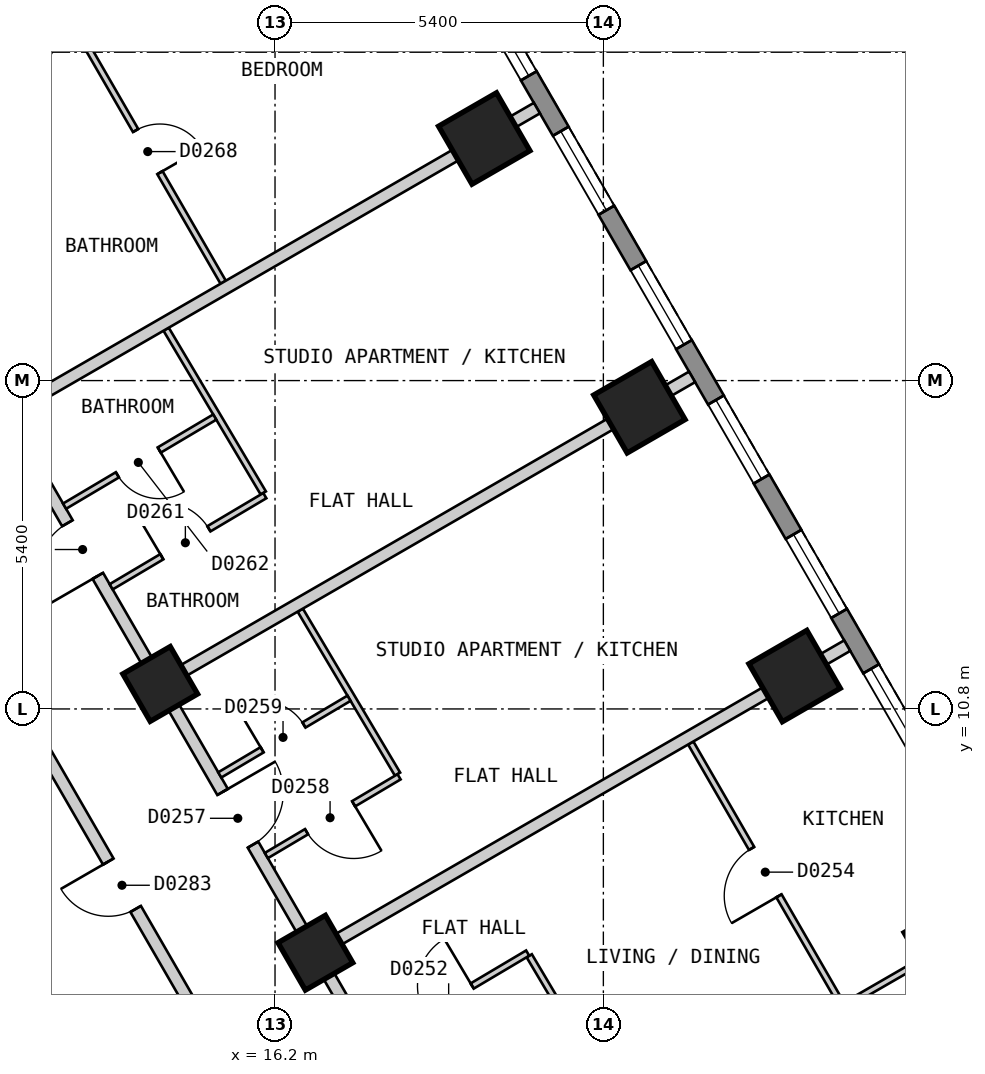
"""IFC4 building model, lengths in metres.
Left out: names, types, materials, properties, quantities, classifications, styles, units other than length and angle.
Written with IfcOpenShell. Run it as: python <this file> out.ifc"""

import sys

from ifc_helpers import new_model, si_unit, direction, frame, frame_2d, origin, origin_2d, place, context, subcontext, project, spatial, polyline, rectangle, outline, extrude, element, fill, save


model = new_model("IFC4")
c1 = context("Model", 3, precision=1e-05, world=origin(), true_north=direction((0.0, 1.0)))
c2 = subcontext(c1, "Body", "Model", "MODEL_VIEW")
j1 = project(units=[si_unit("LENGTHUNIT", "METRE"), si_unit("PLANEANGLEUNIT", "RADIAN")], contexts=[c1])
p1 = place(None, origin())
s1 = spatial("IfcSite", under=j1, at=p1, CompositionType="ELEMENT")
p2 = place(p1, origin())
s2 = spatial("IfcBuilding", under=s1, at=p2, CompositionType="ELEMENT")
p3 = place(p2, frame((0.0, 0.0, 41.4)))
s3 = spatial("IfcBuildingStorey", under=s2, at=p3, CompositionType="ELEMENT", Elevation=41.4)
for number, where, z_axis, x_axis in (
    (1, (27.297, 6.921, 0.0), (0.0, 0.0, 1.0), (-0.5, 0.866, 0.0)),
    (2, (24.745, 11.341, 0.0), (0.0, 0.0, 1.0), (-0.5, 0.866, 0.0)),
    (3, (22.193, 15.761, 0.0), (0.0, 0.0, 1.0), (-0.5, 0.866, 0.0)),
    (4, (19.641, 20.181, 0.0), (0.0, 0.0, 1.0), (-0.5, 0.866, 0.0)),
):
    element("IfcColumn", number, at=place(p3, frame(where, z_axis=z_axis, x_axis=x_axis)), inside=s3, PredefinedType="COLUMN", context=c2, shape_type="SweptSolid", body=[
        extrude(rectangle(XDim=1.1, YDim=1.1, at=origin_2d()), origin(), (0.0, 0.0, 1.0), 3.0),
    ])
for number, where, z_axis, x_axis in (
    (5, (16.864, 6.791, 0.0), (0.0, 0.0, 1.0), (-0.5, 0.866, 0.0)),
    (6, (14.312, 11.211, 0.0), (0.0, 0.0, 1.0), (-0.5, 0.866, 0.0)),
):
    element("IfcColumn", number, at=place(p3, frame(where, z_axis=z_axis, x_axis=x_axis)), inside=s3, PredefinedType="COLUMN", context=c2, shape_type="SweptSolid", body=[
        extrude(rectangle(XDim=0.9, YDim=0.9, at=origin_2d()), origin(), (0.0, 0.0, 1.0), 3.0),
    ])
p4 = place(p3, frame((31.22, 2.425, 0.0), z_axis=(0.0, 0.0, 1.0), x_axis=(-0.500001938803, 0.866024284413, 0.0)))
e7 = element("IfcWall", 7, at=p4, inside=s3, PredefinedType="SOLIDWALL", context=c2, shape_type="SweptSolid", body=[
    extrude(outline(polyline([(0.0, -0.15), (27.02, -0.15), (26.94, 0.15), (0.08, 0.15), (0.0, -0.15)])), origin(), (0.0, 0.0, 1.0), 2.7),
])
p5 = place(p4, frame((1.277, 0.0, 0.15)))
e8 = element("IfcOpeningElement", 8, at=p5, cuts=e7, PredefinedType="OPENING", context=c2, shape_type="SweptSolid", body=[
    extrude(rectangle(XDim=1.5, YDim=2.1, at=frame_2d((0.75, 1.05))), frame((0.0, 0.16, 0.0), z_axis=(0.0, -1.0, 0.0), x_axis=(1.0, 0.0, 0.0)), (0.0, 0.0, 1.0), 0.32),
])
p6 = place(p4, frame((3.829, 0.0, 0.15)))
e9 = element("IfcOpeningElement", 9, at=p6, cuts=e7, PredefinedType="OPENING", context=c2, shape_type="SweptSolid", body=[
    extrude(rectangle(XDim=1.5, YDim=2.1, at=frame_2d((0.75, 1.05))), frame((0.0, 0.16, 0.0), z_axis=(0.0, -1.0, 0.0), x_axis=(1.0, 0.0, 0.0)), (0.0, 0.0, 1.0), 0.32),
])
p7 = place(p4, frame((6.382, 0.0, 0.15)))
e10 = element("IfcOpeningElement", 10, at=p7, cuts=e7, PredefinedType="OPENING", context=c2, shape_type="SweptSolid", body=[
    extrude(rectangle(XDim=1.5, YDim=2.1, at=frame_2d((0.75, 1.05))), frame((0.0, 0.16, 0.0), z_axis=(0.0, -1.0, 0.0), x_axis=(1.0, 0.0, 0.0)), (0.0, 0.0, 1.0), 0.32),
])
p8 = place(p4, frame((8.933, 0.0, 0.15)))
e11 = element("IfcOpeningElement", 11, at=p8, cuts=e7, PredefinedType="OPENING", context=c2, shape_type="SweptSolid", body=[
    extrude(rectangle(XDim=1.5, YDim=2.1, at=frame_2d((0.75, 1.05))), frame((0.0, 0.16, 0.0), z_axis=(0.0, -1.0, 0.0), x_axis=(1.0, 0.0, 0.0)), (0.0, 0.0, 1.0), 0.32),
])
p9 = place(p4, frame((11.485, 0.0, 0.15)))
e12 = element("IfcOpeningElement", 12, at=p9, cuts=e7, PredefinedType="OPENING", context=c2, shape_type="SweptSolid", body=[
    extrude(rectangle(XDim=1.5, YDim=2.1, at=frame_2d((0.75, 1.05))), frame((0.0, 0.16, 0.0), z_axis=(0.0, -1.0, 0.0), x_axis=(1.0, 0.0, 0.0)), (0.0, 0.0, 1.0), 0.32),
])
p10 = place(p4, frame((14.037, 0.0, 0.15)))
e13 = element("IfcOpeningElement", 13, at=p10, cuts=e7, PredefinedType="OPENING", context=c2, shape_type="SweptSolid", body=[
    extrude(rectangle(XDim=1.5, YDim=2.1, at=frame_2d((0.75, 1.05))), frame((0.0, 0.16, 0.0), z_axis=(0.0, -1.0, 0.0), x_axis=(1.0, 0.0, 0.0)), (0.0, 0.0, 1.0), 0.32),
])
p11 = place(p4, frame((16.589, 0.0, 0.15)))
e14 = element("IfcOpeningElement", 14, at=p11, cuts=e7, PredefinedType="OPENING", context=c2, shape_type="SweptSolid", body=[
    extrude(rectangle(XDim=1.5, YDim=2.1, at=frame_2d((0.75, 1.05))), frame((0.0, 0.16, 0.0), z_axis=(0.0, -1.0, 0.0), x_axis=(1.0, 0.0, 0.0)), (0.0, 0.0, 1.0), 0.32),
])
p12 = place(p4, frame((19.141, 0.0, 0.15)))
e15 = element("IfcOpeningElement", 15, at=p12, cuts=e7, PredefinedType="OPENING", context=c2, shape_type="SweptSolid", body=[
    extrude(rectangle(XDim=1.5, YDim=2.1, at=frame_2d((0.75, 1.05))), frame((0.0, 0.16, 0.0), z_axis=(0.0, -1.0, 0.0), x_axis=(1.0, 0.0, 0.0)), (0.0, 0.0, 1.0), 0.32),
])
p13 = place(p4, frame((21.693, 0.0, 0.15)))
e16 = element("IfcOpeningElement", 16, at=p13, cuts=e7, PredefinedType="OPENING", context=c2, shape_type="SweptSolid", body=[
    extrude(rectangle(XDim=1.5, YDim=2.1, at=frame_2d((0.75, 1.05))), frame((0.0, 0.16, 0.0), z_axis=(0.0, -1.0, 0.0), x_axis=(1.0, 0.0, 0.0)), (0.0, 0.0, 1.0), 0.32),
])
p14 = place(p4, frame((24.244, 0.0, 0.15)))
e17 = element("IfcOpeningElement", 17, at=p14, cuts=e7, PredefinedType="OPENING", context=c2, shape_type="SweptSolid", body=[
    extrude(rectangle(XDim=1.5, YDim=2.1, at=frame_2d((0.75, 1.05))), frame((0.0, 0.16, 0.0), z_axis=(0.0, -1.0, 0.0), x_axis=(1.0, 0.0, 0.0)), (0.0, 0.0, 1.0), 0.32),
])
p15 = place(p3, frame((9.18, 15.7, 0.0), z_axis=(0.0, 0.0, 1.0), x_axis=(0.500003652032, -0.866023295272, 0.0)))
e18 = element("IfcWall", 18, at=p15, inside=s3, PredefinedType="PARTITIONING", context=c2, shape_type="SweptSolid", body=[
    extrude(rectangle(XDim=18.012, YDim=0.2, at=frame_2d((9.006, 0.0))), origin(), (0.0, 0.0, 1.0), 2.7),
])
p16 = place(p15, frame((8.556, 0.0, 0.0)))
e19 = element("IfcOpeningElement", 19, at=p16, cuts=e18, PredefinedType="OPENING", context=c2, shape_type="SweptSolid", body=[
    extrude(rectangle(XDim=0.9, YDim=2.1, at=frame_2d((0.45, 1.05))), frame((0.0, 0.11, 0.0), z_axis=(0.0, -1.0, 0.0), x_axis=(1.0, 0.0, 0.0)), (0.0, 0.0, 1.0), 0.22),
])
p17 = place(p3, frame((10.45, 17.9, 0.0), z_axis=(0.0, 0.0, 1.0), x_axis=(0.500034352617, -0.866005569383, 0.0)))
e20 = element("IfcWall", 20, at=p17, inside=s3, PredefinedType="PARTITIONING", context=c2, shape_type="SweptSolid", body=[
    extrude(rectangle(XDim=20.553, YDim=0.2, at=frame_2d((10.276, 0.0))), origin(), (0.0, 0.0, 1.0), 2.7),
])
p18 = place(p17, frame((14.879, 0.0, 0.0)))
e21 = element("IfcOpeningElement", 21, at=p18, cuts=e20, PredefinedType="OPENING", context=c2, shape_type="SweptSolid", body=[
    extrude(rectangle(XDim=1.0, YDim=2.1, at=frame_2d((0.5, 1.05))), frame((0.0, 0.11, 0.0), z_axis=(0.0, -1.0, 0.0), x_axis=(1.0, 0.0, 0.0)), (0.0, 0.0, 1.0), 0.22),
])
p19 = place(p17, frame((9.775, 0.0, 0.0)))
e22 = element("IfcOpeningElement", 22, at=p19, cuts=e20, PredefinedType="OPENING", context=c2, shape_type="SweptSolid", body=[
    extrude(rectangle(XDim=1.0, YDim=2.1, at=frame_2d((0.5, 1.05))), frame((0.0, 0.11, 0.0), z_axis=(0.0, -1.0, 0.0), x_axis=(1.0, 0.0, 0.0)), (0.0, 0.0, 1.0), 0.22),
])
p20 = place(p17, frame((4.671, 0.0, 0.0)))
e23 = element("IfcOpeningElement", 23, at=p20, cuts=e20, PredefinedType="OPENING", context=c2, shape_type="SweptSolid", body=[
    extrude(rectangle(XDim=1.0, YDim=2.1, at=frame_2d((0.5, 1.05))), frame((0.0, 0.11, 0.0), z_axis=(0.0, -1.0, 0.0), x_axis=(1.0, 0.0, 0.0)), (0.0, 0.0, 1.0), 0.22),
])
p21 = place(p3, frame((16.615, 12.425, 0.0), z_axis=(0.0, 0.0, 1.0), x_axis=(0.510241930604, -0.860030913546, 0.0)))
e24 = element("IfcWall", 24, at=p21, inside=s3, PredefinedType="PARTITIONING", context=c2, shape_type="SweptSolid", body=[
    extrude(rectangle(XDim=3.136, YDim=0.1, at=frame_2d((1.568, 0.0))), origin(), (0.0, 0.0, 1.0), 2.7),
])
p22 = place(p3, frame((20.381, 6.741, 0.0), z_axis=(0.0, 0.0, 1.0), x_axis=(0.510224755389, -0.860041103081, 0.0)))
e25 = element("IfcWall", 25, at=p22, inside=s3, PredefinedType="PARTITIONING", context=c2, shape_type="SweptSolid", body=[
    extrude(rectangle(XDim=3.216, YDim=0.1, at=frame_2d((1.608, 0.0))), origin(), (0.0, 0.0, 1.0), 2.7),
])
p23 = place(p3, frame((14.409, 17.045, 0.0), z_axis=(0.0, 0.0, 1.0), x_axis=(0.510362209222, -0.859959542884, 0.0)))
e26 = element("IfcWall", 26, at=p23, inside=s3, PredefinedType="PARTITIONING", context=c2, shape_type="SweptSolid", body=[
    extrude(rectangle(XDim=3.131, YDim=0.1, at=frame_2d((1.566, 0.0))), origin(), (0.0, 0.0, 1.0), 2.7),
])
p24 = place(p3, frame((12.846, 22.15, 0.0), z_axis=(0.0, 0.0, 1.0), x_axis=(0.500002715276, -0.866023836113, 0.0)))
e27 = element("IfcWall", 27, at=p24, inside=s3, PredefinedType="PARTITIONING", context=c2, shape_type="SweptSolid", body=[
    extrude(rectangle(XDim=5.002, YDim=0.1, at=frame_2d((2.501, 0.0))), origin(), (0.0, 0.0, 1.0), 2.7),
])
p25 = place(p24, frame((2.122, 0.0, 0.0)))
e28 = element("IfcOpeningElement", 28, at=p25, cuts=e27, PredefinedType="OPENING", context=c2, shape_type="SweptSolid", body=[
    extrude(rectangle(XDim=0.8, YDim=2.1, at=frame_2d((0.4, 1.05))), frame((0.0, 0.06, 0.0), z_axis=(0.0, -1.0, 0.0), x_axis=(1.0, 0.0, 0.0)), (0.0, 0.0, 1.0), 0.12),
])
p26 = place(p3, frame((23.037, 10.24, 0.0), z_axis=(0.0, 0.0, 1.0), x_axis=(0.499907296314, -0.866078919667, 0.0)))
e29 = element("IfcWall", 29, at=p26, inside=s3, PredefinedType="PARTITIONING", context=c2, shape_type="SweptSolid", body=[
    extrude(rectangle(XDim=4.955, YDim=0.1, at=frame_2d((2.477, 0.0))), origin(), (0.0, 0.0, 1.0), 2.7),
])
p27 = place(p26, frame((2.002, 0.0, 0.0)))
e30 = element("IfcOpeningElement", 30, at=p27, cuts=e29, PredefinedType="OPENING", context=c2, shape_type="SweptSolid", body=[
    extrude(rectangle(XDim=0.9, YDim=2.1, at=frame_2d((0.45, 1.05))), frame((0.0, 0.06, 0.0), z_axis=(0.0, -1.0, 0.0), x_axis=(1.0, 0.0, 0.0)), (0.0, 0.0, 1.0), 0.12),
])
p28 = place(p3, frame((10.393, 18.0, 0.0), z_axis=(0.0, 0.0, 1.0), x_axis=(0.499945497007, 0.866056868816, 0.0)))
e31 = element("IfcWall", 31, at=p28, inside=s3, PredefinedType="PARTITIONING", context=c2, shape_type="SweptSolid", body=[
    extrude(rectangle(XDim=10.265, YDim=0.1, at=frame_2d((5.132, 0.0))), origin(), (0.0, 0.0, 1.0), 2.7),
])
p29 = place(p28, frame((7.108, 0.0, 0.0)))
e32 = element("IfcOpeningElement", 32, at=p29, cuts=e31, PredefinedType="OPENING", context=c2, shape_type="SweptSolid", body=[
    extrude(rectangle(XDim=0.9, YDim=2.1, at=frame_2d((0.45, 1.05))), frame((0.0, 0.06, 0.0), z_axis=(0.0, -1.0, 0.0), x_axis=(1.0, 0.0, 0.0)), (0.0, 0.0, 1.0), 0.12),
])
p30 = place(p3, frame((19.503, 2.421, 0.0), z_axis=(0.0, 0.0, 1.0), x_axis=(0.866065245018, 0.499930986609, 0.0)))
e33 = element("IfcWall", 33, at=p30, inside=s3, PredefinedType="PARTITIONING", context=c2, shape_type="SweptSolid", body=[
    extrude(rectangle(XDim=10.0, YDim=0.1, at=frame_2d((5.0, 0.0))), origin(), (0.0, 0.0, 1.0), 2.7),
])
p31 = place(p30, frame((4.932, 0.0, 0.0)))
e34 = element("IfcOpeningElement", 34, at=p31, cuts=e33, PredefinedType="OPENING", context=c2, shape_type="SweptSolid", body=[
    extrude(rectangle(XDim=0.9, YDim=2.1, at=frame_2d((0.45, 1.05))), frame((0.0, 0.06, 0.0), z_axis=(0.0, -1.0, 0.0), x_axis=(1.0, 0.0, 0.0)), (0.0, 0.0, 1.0), 0.12),
])
p32 = place(p3, frame((17.843, 5.295, 0.0), z_axis=(0.0, 0.0, 1.0), x_axis=(0.860078277555, 0.510162088436, 0.0)))
e35 = element("IfcWall", 35, at=p32, inside=s3, PredefinedType="PARTITIONING", context=c2, shape_type="SweptSolid", body=[
    extrude(rectangle(XDim=2.921, YDim=0.1, at=frame_2d((1.46, 0.0))), origin(), (0.0, 0.0, 1.0), 2.7),
])
p33 = place(p32, frame((0.96, 0.0, 0.0)))
e36 = element("IfcOpeningElement", 36, at=p33, cuts=e35, PredefinedType="OPENING", context=c2, shape_type="SweptSolid", body=[
    extrude(rectangle(XDim=0.9, YDim=2.1, at=frame_2d((0.45, 1.05))), frame((0.0, 0.06, 0.0), z_axis=(0.0, -1.0, 0.0), x_axis=(1.0, 0.0, 0.0)), (0.0, 0.0, 1.0), 0.12),
])
p34 = place(p3, frame((16.057, 8.389, 0.0), z_axis=(0.0, 0.0, 1.0), x_axis=(0.860036770423, 0.510232058499, 0.0)))
e37 = element("IfcWall", 37, at=p34, inside=s3, PredefinedType="PARTITIONING", context=c2, shape_type="SweptSolid", body=[
    extrude(rectangle(XDim=2.538, YDim=0.1, at=frame_2d((1.269, 0.0))), origin(), (0.0, 0.0, 1.0), 2.7),
])
p35 = place(p34, frame((0.769, 0.0, 0.0)))
e38 = element("IfcOpeningElement", 38, at=p35, cuts=e37, PredefinedType="OPENING", context=c2, shape_type="SweptSolid", body=[
    extrude(rectangle(XDim=0.9, YDim=2.1, at=frame_2d((0.45, 1.05))), frame((0.0, 0.06, 0.0), z_axis=(0.0, -1.0, 0.0), x_axis=(1.0, 0.0, 0.0)), (0.0, 0.0, 1.0), 0.12),
])
p36 = place(p3, frame((13.505, 12.809, 0.0), z_axis=(0.0, 0.0, 1.0), x_axis=(0.860070102739, 0.510175870043, 0.0)))
e39 = element("IfcWall", 39, at=p36, inside=s3, PredefinedType="PARTITIONING", context=c2, shape_type="SweptSolid", body=[
    extrude(rectangle(XDim=2.938, YDim=0.1, at=frame_2d((1.469, 0.0))), origin(), (0.0, 0.0, 1.0), 2.7),
])
p37 = place(p36, frame((0.969, 0.0, 0.0)))
e40 = element("IfcOpeningElement", 40, at=p37, cuts=e39, PredefinedType="OPENING", context=c2, shape_type="SweptSolid", body=[
    extrude(rectangle(XDim=0.9, YDim=2.1, at=frame_2d((0.45, 1.05))), frame((0.0, 0.06, 0.0), z_axis=(0.0, -1.0, 0.0), x_axis=(1.0, 0.0, 0.0)), (0.0, 0.0, 1.0), 0.12),
])
p38 = place(p3, frame((12.739, 14.135, 0.0), z_axis=(0.0, 0.0, 1.0), x_axis=(0.860077414703, 0.510163543109, 0.0)))
e41 = element("IfcWall", 41, at=p38, inside=s3, PredefinedType="PARTITIONING", context=c2, shape_type="SweptSolid", body=[
    extrude(rectangle(XDim=2.872, YDim=0.1, at=frame_2d((1.436, 0.0))), origin(), (0.0, 0.0, 1.0), 2.7),
])
p39 = place(p38, frame((1.01, 0.0, 0.0)))
e42 = element("IfcOpeningElement", 42, at=p39, cuts=e41, PredefinedType="OPENING", context=c2, shape_type="SweptSolid", body=[
    extrude(rectangle(XDim=0.8, YDim=2.1, at=frame_2d((0.4, 1.05))), frame((0.0, 0.06, 0.0), z_axis=(0.0, -1.0, 0.0), x_axis=(1.0, 0.0, 0.0)), (0.0, 0.0, 1.0), 0.12),
])
p40 = place(p3, frame((15.291, 9.715, 0.0), z_axis=(0.0, 0.0, 1.0), x_axis=(0.860087708271, 0.510146188932, 0.0)))
e43 = element("IfcWall", 43, at=p40, inside=s3, PredefinedType="PARTITIONING", context=c2, shape_type="SweptSolid", body=[
    extrude(rectangle(XDim=2.472, YDim=0.1, at=frame_2d((1.236, 0.0))), origin(), (0.0, 0.0, 1.0), 2.7),
])
p41 = place(p40, frame((0.81, 0.0, 0.0)))
e44 = element("IfcOpeningElement", 44, at=p41, cuts=e43, PredefinedType="OPENING", context=c2, shape_type="SweptSolid", body=[
    extrude(rectangle(XDim=0.8, YDim=2.1, at=frame_2d((0.4, 1.05))), frame((0.0, 0.06, 0.0), z_axis=(0.0, -1.0, 0.0), x_axis=(1.0, 0.0, 0.0)), (0.0, 0.0, 1.0), 0.12),
])
for number, where, z_axis, x_axis in (
    (45, (16.95, 6.841, 0.0), (0.0, 0.0, 1.0), (0.866, 0.5, 0.0)),
    (46, (11.847, 15.681, 0.0), (0.0, 0.0, 1.0), (0.866, 0.5, 0.0)),
    (47, (14.399, 11.261, 0.0), (0.0, 0.0, 1.0), (0.866, 0.5, 0.0)),
):
    element("IfcWall", number, at=place(p3, frame(where, z_axis=z_axis, x_axis=x_axis)), inside=s3, PredefinedType="PARTITIONING", context=c2, shape_type="SweptSolid", body=[
        extrude(rectangle(XDim=10.0, YDim=0.2, at=frame_2d((5.0, 0.0))), origin(), (0.0, 0.0, 1.0), 2.7),
    ])
p42 = place(p8, origin())
e48 = element("IfcWindow", 48, at=p42, inside=s3, PartitioningType="SINGLE_PANEL", PredefinedType="WINDOW", context=c2, shape_type="SweptSolid", body=[
    extrude(rectangle(XDim=1.5, YDim=2.1, at=frame_2d((0.75, 1.05))), frame((0.0, 0.03, 0.0), z_axis=(0.0, -1.0, 0.0), x_axis=(1.0, 0.0, 0.0)), (0.0, 0.0, 1.0), 0.06),
])
fill(e11, e48)
p43 = place(p9, origin())
e49 = element("IfcWindow", 49, at=p43, inside=s3, PartitioningType="SINGLE_PANEL", PredefinedType="WINDOW", context=c2, shape_type="SweptSolid", body=[
    extrude(rectangle(XDim=1.5, YDim=2.1, at=frame_2d((0.75, 1.05))), frame((0.0, 0.03, 0.0), z_axis=(0.0, -1.0, 0.0), x_axis=(1.0, 0.0, 0.0)), (0.0, 0.0, 1.0), 0.06),
])
fill(e12, e49)
p44 = place(p10, origin())
e50 = element("IfcWindow", 50, at=p44, inside=s3, PartitioningType="SINGLE_PANEL", PredefinedType="WINDOW", context=c2, shape_type="SweptSolid", body=[
    extrude(rectangle(XDim=1.5, YDim=2.1, at=frame_2d((0.75, 1.05))), frame((0.0, 0.03, 0.0), z_axis=(0.0, -1.0, 0.0), x_axis=(1.0, 0.0, 0.0)), (0.0, 0.0, 1.0), 0.06),
])
fill(e13, e50)
p45 = place(p11, origin())
e51 = element("IfcWindow", 51, at=p45, inside=s3, PartitioningType="SINGLE_PANEL", PredefinedType="WINDOW", context=c2, shape_type="SweptSolid", body=[
    extrude(rectangle(XDim=1.5, YDim=2.1, at=frame_2d((0.75, 1.05))), frame((0.0, 0.03, 0.0), z_axis=(0.0, -1.0, 0.0), x_axis=(1.0, 0.0, 0.0)), (0.0, 0.0, 1.0), 0.06),
])
fill(e14, e51)
p46 = place(p12, origin())
e52 = element("IfcWindow", 52, at=p46, inside=s3, PartitioningType="SINGLE_PANEL", PredefinedType="WINDOW", context=c2, shape_type="SweptSolid", body=[
    extrude(rectangle(XDim=1.5, YDim=2.1, at=frame_2d((0.75, 1.05))), frame((0.0, 0.03, 0.0), z_axis=(0.0, -1.0, 0.0), x_axis=(1.0, 0.0, 0.0)), (0.0, 0.0, 1.0), 0.06),
])
fill(e15, e52)
p47 = place(p13, origin())
e53 = element("IfcWindow", 53, at=p47, inside=s3, PartitioningType="SINGLE_PANEL", PredefinedType="WINDOW", context=c2, shape_type="SweptSolid", body=[
    extrude(rectangle(XDim=1.5, YDim=2.1, at=frame_2d((0.75, 1.05))), frame((0.0, 0.03, 0.0), z_axis=(0.0, -1.0, 0.0), x_axis=(1.0, 0.0, 0.0)), (0.0, 0.0, 1.0), 0.06),
])
fill(e16, e53)
p48 = place(p33, origin())
e54 = element("IfcDoor", 54, at=p48, inside=s3, OperationType="SINGLE_SWING_RIGHT", PredefinedType="DOOR", context=c2, shape_type="SweptSolid", body=[
    extrude(rectangle(XDim=0.9, YDim=2.1, at=frame_2d((0.45, 1.05))), frame((0.0, 0.025, 0.0), z_axis=(0.0, -1.0, 0.0), x_axis=(1.0, 0.0, 0.0)), (0.0, 0.0, 1.0), 0.05),
])
fill(e36, e54)
p49 = place(p27, origin())
e55 = element("IfcDoor", 55, at=p49, inside=s3, OperationType="SINGLE_SWING_RIGHT", PredefinedType="DOOR", context=c2, shape_type="SweptSolid", body=[
    extrude(rectangle(XDim=0.9, YDim=2.1, at=frame_2d((0.45, 1.05))), frame((0.0, 0.025, 0.0), z_axis=(0.0, -1.0, 0.0), x_axis=(1.0, 0.0, 0.0)), (0.0, 0.0, 1.0), 0.05),
])
fill(e30, e55)
p50 = place(p19, origin())
e56 = element("IfcDoor", 56, at=p50, inside=s3, OperationType="SINGLE_SWING_LEFT", PredefinedType="DOOR", context=c2, shape_type="SweptSolid", body=[
    extrude(rectangle(XDim=1.0, YDim=2.1, at=frame_2d((0.5, 1.05))), frame((0.0, 0.025, 0.0), z_axis=(0.0, -1.0, 0.0), x_axis=(1.0, 0.0, 0.0)), (0.0, 0.0, 1.0), 0.05),
])
fill(e22, e56)
p51 = place(p35, origin())
e57 = element("IfcDoor", 57, at=p51, inside=s3, OperationType="SINGLE_SWING_RIGHT", PredefinedType="DOOR", context=c2, shape_type="SweptSolid", body=[
    extrude(rectangle(XDim=0.9, YDim=2.1, at=frame_2d((0.45, 1.05))), frame((0.0, 0.025, 0.0), z_axis=(0.0, -1.0, 0.0), x_axis=(1.0, 0.0, 0.0)), (0.0, 0.0, 1.0), 0.05),
])
fill(e38, e57)
p52 = place(p41, origin())
e58 = element("IfcDoor", 58, at=p52, inside=s3, OperationType="SINGLE_SWING_LEFT", PredefinedType="DOOR", context=c2, shape_type="SweptSolid", body=[
    extrude(rectangle(XDim=0.8, YDim=2.1, at=frame_2d((0.4, 1.05))), frame((0.0, 0.025, 0.0), z_axis=(0.0, -1.0, 0.0), x_axis=(1.0, 0.0, 0.0)), (0.0, 0.0, 1.0), 0.05),
])
fill(e44, e58)
p53 = place(p20, origin())
e59 = element("IfcDoor", 59, at=p53, inside=s3, OperationType="SINGLE_SWING_RIGHT", PredefinedType="DOOR", context=c2, shape_type="SweptSolid", body=[
    extrude(rectangle(XDim=1.0, YDim=2.1, at=frame_2d((0.5, 1.05))), frame((0.0, 0.025, 0.0), z_axis=(0.0, -1.0, 0.0), x_axis=(1.0, 0.0, 0.0)), (0.0, 0.0, 1.0), 0.05),
])
fill(e23, e59)
p54 = place(p37, origin())
e60 = element("IfcDoor", 60, at=p54, inside=s3, OperationType="SINGLE_SWING_LEFT", PredefinedType="DOOR", context=c2, shape_type="SweptSolid", body=[
    extrude(rectangle(XDim=0.9, YDim=2.1, at=frame_2d((0.45, 1.05))), frame((0.0, 0.025, 0.0), z_axis=(0.0, -1.0, 0.0), x_axis=(1.0, 0.0, 0.0)), (0.0, 0.0, 1.0), 0.05),
])
fill(e40, e60)
p55 = place(p39, origin())
e61 = element("IfcDoor", 61, at=p55, inside=s3, OperationType="SINGLE_SWING_RIGHT", PredefinedType="DOOR", context=c2, shape_type="SweptSolid", body=[
    extrude(rectangle(XDim=0.8, YDim=2.1, at=frame_2d((0.4, 1.05))), frame((0.0, 0.025, 0.0), z_axis=(0.0, -1.0, 0.0), x_axis=(1.0, 0.0, 0.0)), (0.0, 0.0, 1.0), 0.05),
])
fill(e42, e61)
p56 = place(p25, origin())
e62 = element("IfcDoor", 62, at=p56, inside=s3, OperationType="SINGLE_SWING_RIGHT", PredefinedType="DOOR", context=c2, shape_type="SweptSolid", body=[
    extrude(rectangle(XDim=0.8, YDim=2.1, at=frame_2d((0.4, 1.05))), frame((0.0, 0.025, 0.0), z_axis=(0.0, -1.0, 0.0), x_axis=(1.0, 0.0, 0.0)), (0.0, 0.0, 1.0), 0.05),
])
fill(e28, e62)
p57 = place(p16, origin())
e63 = element("IfcDoor", 63, at=p57, inside=s3, OperationType="SINGLE_SWING_LEFT", PredefinedType="DOOR", context=c2, shape_type="SweptSolid", body=[
    extrude(rectangle(XDim=0.9, YDim=2.1, at=frame_2d((0.45, 1.05))), frame((0.0, 0.025, 0.0), z_axis=(0.0, -1.0, 0.0), x_axis=(1.0, 0.0, 0.0)), (0.0, 0.0, 1.0), 0.05),
])
fill(e19, e63)
save(model, sys.argv[1])
